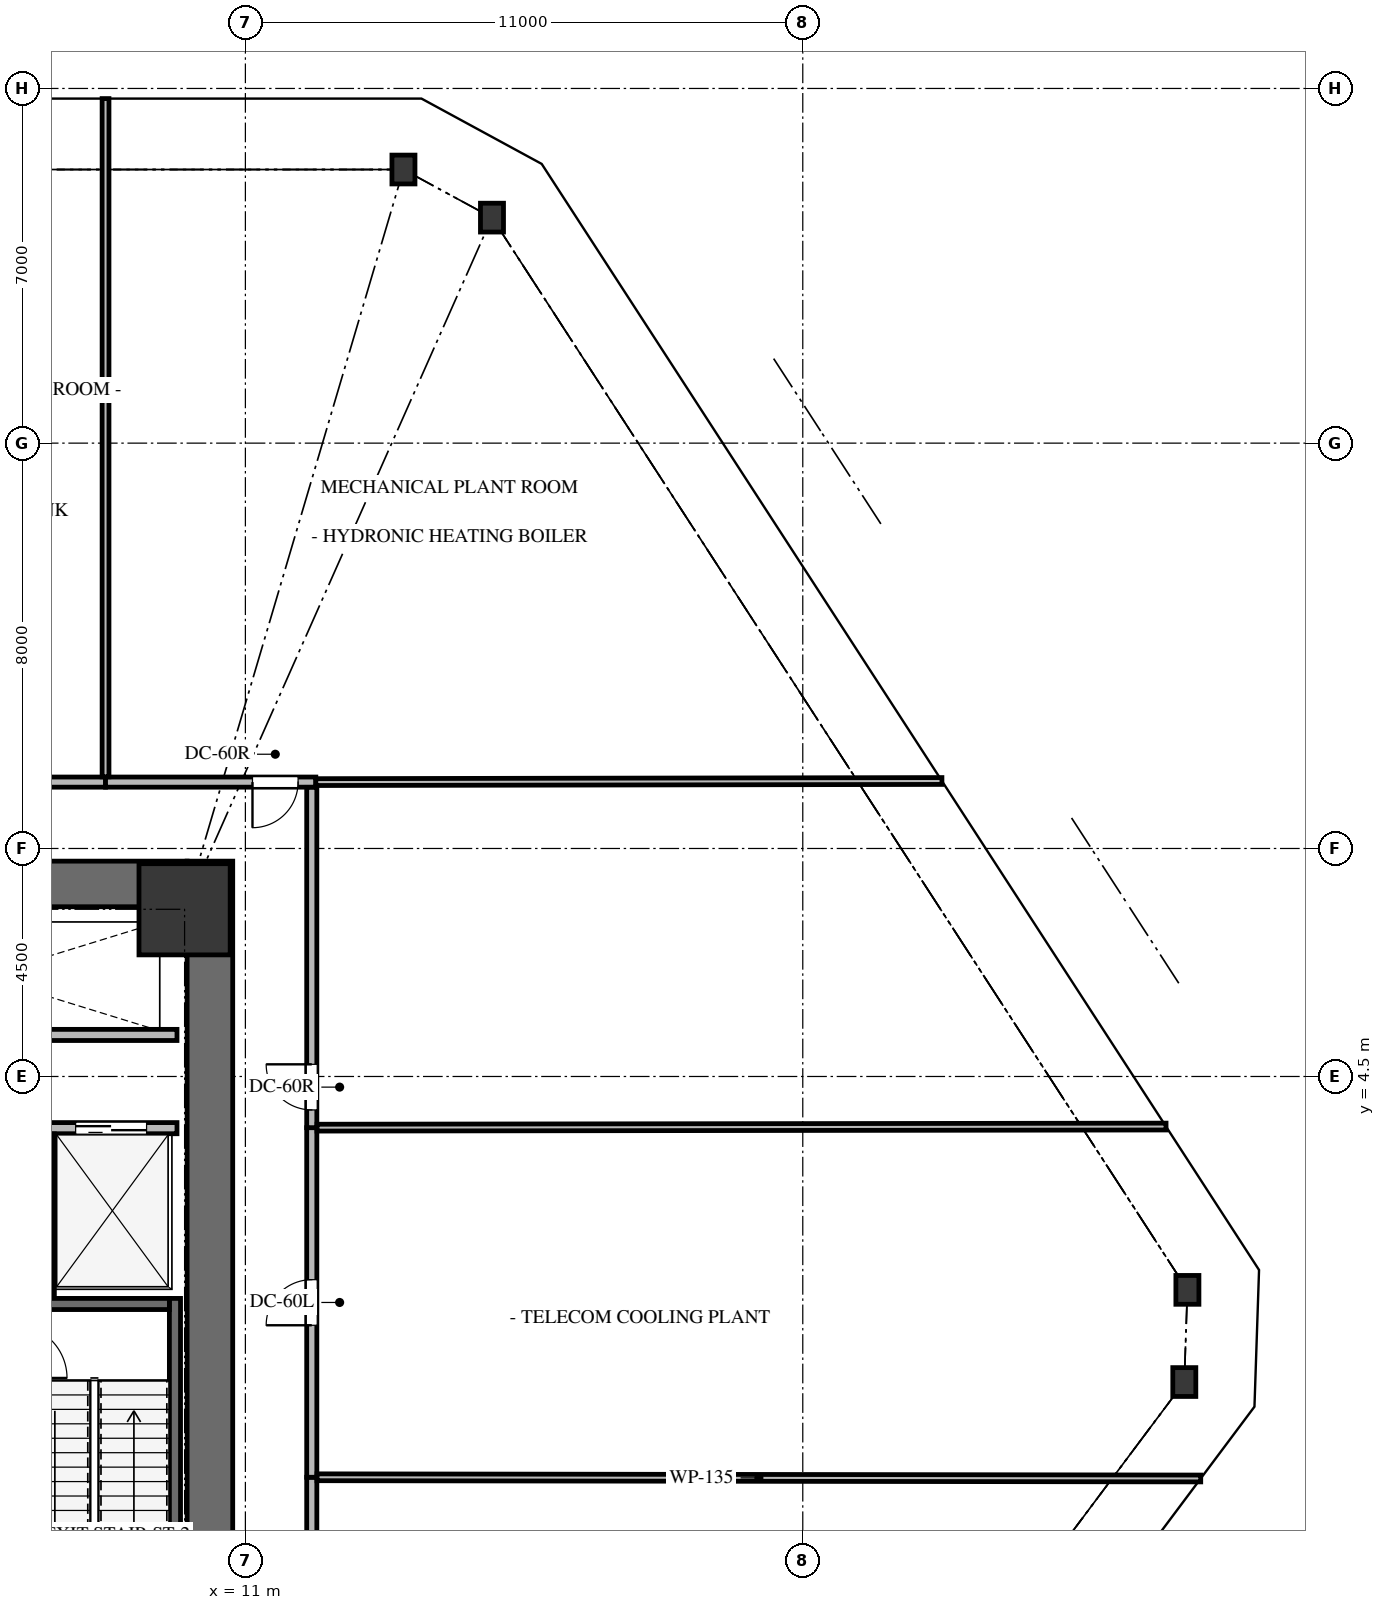
"""IFC4 building model, lengths in metres.
Left out: names, types, materials, properties, quantities, classifications, styles, units other than length and angle.
Written with IfcOpenShell. Run it as: python <this file> out.ifc"""

import sys

from ifc_helpers import new_model, si_unit, direction, frame, frame_2d, origin, origin_2d, place, context, subcontext, project, spatial, rectangle, i_section, extrude, source, transform, mapped, element, fill, save


model = new_model("IFC4")
c1 = context("Model", 3, precision=1e-05, world=origin(), true_north=direction((0.0, 1.0)))
c2 = subcontext(c1, "Body", "Model", "MODEL_VIEW")
j1 = project(units=[si_unit("LENGTHUNIT", "METRE"), si_unit("PLANEANGLEUNIT", "RADIAN")], contexts=[c1])
p1 = place(None, origin())
s1 = spatial("IfcSite", under=j1, at=p1, CompositionType="ELEMENT")
p2 = place(p1, origin())
s2 = spatial("IfcBuilding", under=s1, at=p2, CompositionType="ELEMENT")
p3 = place(p2, frame((0.0, 0.0, 10.4)))
s3 = spatial("IfcBuildingStorey", under=s2, at=p3, CompositionType="ELEMENT", Elevation=10.4)
p4 = place(p3, frame((10.3, -8.75, 0.0), z_axis=(0.0, 0.0, 1.0), x_axis=(0.0, 1.0, 0.0)))
e1 = element("IfcWall", 1, at=p4, inside=s3, PredefinedType="SHEAR", context=c2, shape_type="SweptSolid", body=[
    extrude(rectangle(XDim=17.5, YDim=0.9, at=frame_2d((8.75, 0.0))), origin(), (0.0, 0.0, 1.0), 5.2),
])
p5 = place(p3, frame((-9.85, 8.3, 0.0), z_axis=(0.0, 0.0, 1.0), x_axis=(1.0, 0.0, 0.0)))
e2 = element("IfcWall", 2, at=p5, inside=s3, PredefinedType="SHEAR", context=c2, shape_type="SweptSolid", body=[
    extrude(rectangle(XDim=19.7, YDim=0.9, at=frame_2d((9.85, 0.0))), origin(), (0.0, 0.0, 1.0), 5.2),
])
p6 = place(p3, frame((9.61, -7.77, -0.35), z_axis=(0.0, 0.0, 1.0), x_axis=(0.0, 1.0, 0.0)))
e3 = element("IfcWall", 3, at=p6, inside=s3, PredefinedType="SHEAR", context=c2, shape_type="SweptSolid", body=[
    extrude(rectangle(XDim=7.89, YDim=0.22, at=frame_2d((3.945, 0.0))), origin(), (0.0, 0.0, 1.0), 5.23),
])
p7 = place(p3, frame((9.5, 0.01, -0.35), z_axis=(0.0, 0.0, 1.0), x_axis=(-1.0, 0.0, 0.0)))
e4 = element("IfcWall", 4, at=p7, inside=s3, PredefinedType="SHEAR", context=c2, shape_type="SweptSolid", body=[
    extrude(rectangle(XDim=2.96, YDim=0.22, at=frame_2d((1.48, 0.0))), origin(), (0.0, 0.0, 1.0), 5.23),
])
m1 = source(origin(), c2, "Body", "SweptSolid", [
    extrude(rectangle(XDim=1.8, YDim=1.8, at=origin_2d()), origin(), (0.0, 0.0, 1.0), 5.23),
])
p8 = place(p3, frame((9.8, 7.8, -0.35), z_axis=(0.0, 0.0, 1.0), x_axis=(1.0, 0.0, 0.0)))
e5 = element("IfcColumn", 5, at=p8, inside=s3, PredefinedType="COLUMN", context=c2, shape_type="MappedRepresentation", body=[
    mapped(m1, transform((0.0, 0.0, 0.0), x_axis=(1.0, 0.0, 0.0), y_axis=(0.0, 1.0, 0.0), z_axis=(0.0, 0.0, 1.0), scale=1.0)),
])
m2 = source(origin(), c2, "Body", "SweptSolid", [
    extrude(i_section(OverallWidth=0.454, OverallDepth=0.569, WebThickness=0.078, FlangeThickness=0.125, FilletRadius=0.031, at=origin_2d()), origin(), (0.0, 0.0, 1.0), 5.23),
])
for number, where, z_axis, x_axis in (
    (6, (14.119, 22.4, -0.35), (0.0, 0.0, 1.0), (1.0, 0.0, 0.0)),
    (7, (15.866, 21.451, -0.35), (0.0, 0.0, 1.0), (1.0, 0.0, 0.0)),
    (8, (29.591, 0.289, -0.35), (0.0, 0.0, 1.0), (1.0, 0.0, 0.0)),
    (9, (29.529, -1.531, -0.35), (0.0, 0.0, 1.0), (1.0, 0.0, 0.0)),
):
    element("IfcColumn", number, at=place(p3, frame(where, z_axis=z_axis, x_axis=x_axis)), inside=s3, PredefinedType="COLUMN", context=c2, shape_type="MappedRepresentation", body=[
        mapped(m2, transform((0.0, 0.0, 0.0), x_axis=(1.0, 0.0, 0.0), y_axis=(0.0, 1.0, 0.0), z_axis=(0.0, 0.0, 1.0), scale=1.0)),
    ])
p9 = place(p3, frame((4.6, 3.48, 0.0), z_axis=(0.0, 0.0, 1.0), x_axis=(1.0, 0.0, 0.0)))
e10 = element("IfcWall", 10, at=p9, inside=s3, PredefinedType="SOLIDWALL", context=c2, shape_type="SweptSolid", body=[
    extrude(rectangle(XDim=5.05, YDim=0.22, at=frame_2d((2.525, 0.0))), origin(), (0.0, 0.0, 1.0), 4.865),
])
p10 = place(p9, frame((0.55, 0.0, 0.0)))
e11 = element("IfcOpeningElement", 11, at=p10, cuts=e10, PredefinedType="OPENING", context=c2, shape_type="SweptSolid", body=[
    extrude(rectangle(XDim=1.4, YDim=2.15, at=frame_2d((0.7, 1.075))), frame((0.0, 0.12, 0.0), z_axis=(0.0, -1.0, 0.0), x_axis=(1.0, 0.0, 0.0)), (0.0, 0.0, 1.0), 0.24),
])
p11 = place(p9, frame((3.05, 0.0, 0.0)))
e12 = element("IfcOpeningElement", 12, at=p11, cuts=e10, PredefinedType="OPENING", context=c2, shape_type="SweptSolid", body=[
    extrude(rectangle(XDim=1.4, YDim=2.15, at=frame_2d((0.7, 1.075))), frame((0.0, 0.12, 0.0), z_axis=(0.0, -1.0, 0.0), x_axis=(1.0, 0.0, 0.0)), (0.0, 0.0, 1.0), 0.24),
])
p12 = place(p3, frame((7.12, 0.18, 0.0), z_axis=(0.0, 0.0, 1.0), x_axis=(0.0, 1.0, 0.0)))
e13 = element("IfcWall", 13, at=p12, inside=s3, PredefinedType="SOLIDWALL", context=c2, shape_type="SweptSolid", body=[
    extrude(rectangle(XDim=3.186, YDim=0.22, at=frame_2d((1.593, 0.0))), origin(), (0.0, 0.0, 1.0), 4.865),
])
p13 = place(p3, frame((2.325, 5.32, 0.0), z_axis=(0.0, 0.0, 1.0), x_axis=(1.0, 0.0, 0.0)))
e14 = element("IfcWall", 14, at=p13, inside=s3, PredefinedType="SOLIDWALL", context=c2, shape_type="SweptSolid", body=[
    extrude(rectangle(XDim=7.325, YDim=0.22, at=frame_2d((3.663, 0.0))), origin(), (0.0, 0.0, 1.0), 4.865),
])
p14 = place(p3, frame((8.24, 10.31, 0.0), z_axis=(0.0, 0.0, 1.0), x_axis=(-1.0, 0.0, 0.0)))
e15 = element("IfcWall", 15, at=p14, inside=s3, PredefinedType="SOLIDWALL", context=c2, shape_type="SweptSolid", body=[
    extrude(rectangle(XDim=5.5, YDim=0.2, at=frame_2d((2.75, 0.0))), origin(), (0.0, 0.0, 1.0), 4.418),
])
p15 = place(p14, frame((2.3, 0.0, 0.0)))
e16 = element("IfcOpeningElement", 16, at=p15, cuts=e15, PredefinedType="OPENING", context=c2, shape_type="SweptSolid", body=[
    extrude(rectangle(XDim=0.9, YDim=2.05, at=frame_2d((0.45, 1.025))), frame((0.0, 0.11, 0.0), z_axis=(0.0, -1.0, 0.0), x_axis=(1.0, 0.0, 0.0)), (0.0, 0.0, 1.0), 0.22),
])
p16 = place(p3, frame((12.39, 10.31, 0.0), z_axis=(0.0, 0.0, 1.0), x_axis=(-1.0, 0.0, 0.0)))
e17 = element("IfcWall", 17, at=p16, inside=s3, PredefinedType="SOLIDWALL", context=c2, shape_type="SweptSolid", body=[
    extrude(rectangle(XDim=4.15, YDim=0.2, at=frame_2d((2.075, 0.0))), origin(), (0.0, 0.0, 1.0), 3.787),
])
p17 = place(p16, frame((0.35, 0.0, 0.0)))
e18 = element("IfcOpeningElement", 18, at=p17, cuts=e17, PredefinedType="OPENING", context=c2, shape_type="SweptSolid", body=[
    extrude(rectangle(XDim=0.9, YDim=2.05, at=frame_2d((0.45, 1.025))), frame((0.0, 0.11, 0.0), z_axis=(0.0, -1.0, 0.0), x_axis=(1.0, 0.0, 0.0)), (0.0, 0.0, 1.0), 0.22),
])
p18 = place(p3, frame((12.31, -10.206, 0.0), z_axis=(0.0, 0.0, 1.0), x_axis=(0.0, 1.0, 0.0)))
e19 = element("IfcWall", 19, at=p18, inside=s3, PredefinedType="SOLIDWALL", context=c2, shape_type="SweptSolid", body=[
    extrude(rectangle(XDim=6.796, YDim=0.2, at=frame_2d((3.398, 0.0))), origin(), (0.0, 0.0, 1.0), 3.787),
])
p19 = place(p18, frame((3.65, 0.0, 0.0)))
e20 = element("IfcOpeningElement", 20, at=p19, cuts=e19, PredefinedType="OPENING", context=c2, shape_type="SweptSolid", body=[
    extrude(rectangle(XDim=0.9, YDim=2.05, at=frame_2d((0.45, 1.025))), frame((0.0, 0.11, 0.0), z_axis=(0.0, -1.0, 0.0), x_axis=(1.0, 0.0, 0.0)), (0.0, 0.0, 1.0), 0.22),
])
p20 = place(p3, frame((12.31, -3.41, 0.0), z_axis=(0.0, 0.0, 1.0), x_axis=(0.0, 1.0, 0.0)))
e21 = element("IfcWall", 21, at=p20, inside=s3, PredefinedType="SOLIDWALL", context=c2, shape_type="SweptSolid", body=[
    extrude(rectangle(XDim=6.9, YDim=0.2, at=frame_2d((3.45, 0.0))), origin(), (0.0, 0.0, 1.0), 3.787),
])
p21 = place(p20, frame((3.0, 0.0, 0.0)))
e22 = element("IfcOpeningElement", 22, at=p21, cuts=e21, PredefinedType="OPENING", context=c2, shape_type="SweptSolid", body=[
    extrude(rectangle(XDim=0.9, YDim=2.05, at=frame_2d((0.45, 1.025))), frame((0.0, 0.11, 0.0), z_axis=(0.0, -1.0, 0.0), x_axis=(1.0, 0.0, 0.0)), (0.0, 0.0, 1.0), 0.22),
])
p22 = place(p3, frame((12.31, 3.49, 0.0), z_axis=(0.0, 0.0, 1.0), x_axis=(0.0, 1.0, 0.0)))
e23 = element("IfcWall", 23, at=p22, inside=s3, PredefinedType="SOLIDWALL", context=c2, shape_type="SweptSolid", body=[
    extrude(rectangle(XDim=6.716, YDim=0.2, at=frame_2d((3.358, 0.0))), origin(), (0.0, 0.0, 1.0), 4.865),
])
p23 = place(p22, frame((0.35, 0.0, 0.0)))
e24 = element("IfcOpeningElement", 24, at=p23, cuts=e23, PredefinedType="OPENING", context=c2, shape_type="SweptSolid", body=[
    extrude(rectangle(XDim=0.9, YDim=2.05, at=frame_2d((0.45, 1.025))), frame((0.0, 0.11, 0.0), z_axis=(0.0, -1.0, 0.0), x_axis=(1.0, 0.0, 0.0)), (0.0, 0.0, 1.0), 0.22),
])
p24 = place(p3, frame((8.24, 23.8, 0.0), z_axis=(0.0, 0.0, 1.0), x_axis=(0.0, -1.0, 0.0)))
e25 = element("IfcWall", 25, at=p24, inside=s3, PredefinedType="PARTITIONING", context=c2, shape_type="SweptSolid", body=[
    extrude(rectangle(XDim=13.386, YDim=0.135, at=frame_2d((6.693, 0.0))), origin(), (0.0, 0.0, 1.0), 4.174),
])
p25 = place(p3, frame((24.746, 10.332, 0.0), z_axis=(0.0, 0.0, 1.0), x_axis=(-0.999998453823, -0.001758508277, 0.0)))
e26 = element("IfcWall", 26, at=p25, inside=s3, PredefinedType="PARTITIONING", context=c2, shape_type="SweptSolid", body=[
    extrude(rectangle(XDim=12.356, YDim=0.135, at=frame_2d((6.178, 0.0))), origin(), (0.0, 0.0, 1.0), 4.174),
])
p26 = place(p3, frame((12.414, -3.41, 0.0), z_axis=(0.0, 0.0, 1.0), x_axis=(0.999999078008, -0.001357933567, 0.0)))
e27 = element("IfcWall", 27, at=p26, inside=s3, PredefinedType="PARTITIONING", context=c2, shape_type="SweptSolid", body=[
    extrude(rectangle(XDim=17.439, YDim=0.135, at=frame_2d((8.72, 0.0))), origin(), (0.0, 0.0, 1.0), 3.787),
])
p27 = place(p3, frame((12.414, 3.49, 0.0), z_axis=(0.0, 0.0, 1.0), x_axis=(0.999999159095, 0.001296845678, 0.0)))
e28 = element("IfcWall", 28, at=p27, inside=s3, PredefinedType="PARTITIONING", context=c2, shape_type="SweptSolid", body=[
    extrude(rectangle(XDim=16.755, YDim=0.135, at=frame_2d((8.377, 0.0))), origin(), (0.0, 0.0, 1.0), 4.174),
])
m3 = source(origin(), c2, "Body", "SweptSolid", [
    extrude(rectangle(XDim=1.4, YDim=2.15, at=frame_2d((0.7, 1.075))), frame((0.0, 0.025, 0.0), z_axis=(0.0, -1.0, 0.0), x_axis=(1.0, 0.0, 0.0)), (0.0, 0.0, 1.0), 0.05),
])
p28 = place(p11, origin())
e29 = element("IfcDoor", 29, at=p28, inside=s3, OperationType="DOUBLE_DOOR_SLIDING", PredefinedType="DOOR", context=c2, shape_type="MappedRepresentation", body=[
    mapped(m3, transform((0.0, 0.0, 0.0), x_axis=(1.0, 0.0, 0.0), y_axis=(0.0, 1.0, 0.0), z_axis=(0.0, 0.0, 1.0), scale=1.0)),
])
fill(e12, e29)
m4 = source(origin(), c2, "Body", "SweptSolid", [
    extrude(rectangle(XDim=0.9, YDim=2.05, at=frame_2d((0.45, 1.025))), frame((0.0, 0.025, 0.0), z_axis=(0.0, -1.0, 0.0), x_axis=(1.0, 0.0, 0.0)), (0.0, 0.0, 1.0), 0.05),
])
p29 = place(p17, origin())
e30 = element("IfcDoor", 30, at=p29, inside=s3, OperationType="SINGLE_SWING_RIGHT", PredefinedType="DOOR", context=c2, shape_type="MappedRepresentation", body=[
    mapped(m4, transform((0.0, 0.0, 0.0), x_axis=(1.0, 0.0, 0.0), y_axis=(0.0, 1.0, 0.0), z_axis=(0.0, 0.0, 1.0), scale=1.0)),
])
fill(e18, e30)
m5 = source(origin(), c2, "Body", "SweptSolid", [
    extrude(rectangle(XDim=0.9, YDim=2.05, at=frame_2d((0.45, 1.025))), frame((0.0, 0.025, 0.0), z_axis=(0.0, -1.0, 0.0), x_axis=(1.0, 0.0, 0.0)), (0.0, 0.0, 1.0), 0.05),
])
p30 = place(p21, origin())
e31 = element("IfcDoor", 31, at=p30, inside=s3, OperationType="SINGLE_SWING_LEFT", PredefinedType="DOOR", context=c2, shape_type="MappedRepresentation", body=[
    mapped(m5, transform((0.0, 0.0, 0.0), x_axis=(1.0, 0.0, 0.0), y_axis=(0.0, 1.0, 0.0), z_axis=(0.0, 0.0, 1.0), scale=1.0)),
])
fill(e22, e31)
p31 = place(p23, origin())
e32 = element("IfcDoor", 32, at=p31, inside=s3, OperationType="SINGLE_SWING_RIGHT", PredefinedType="DOOR", context=c2, shape_type="MappedRepresentation", body=[
    mapped(m4, transform((0.0, 0.0, 0.0), x_axis=(1.0, 0.0, 0.0), y_axis=(0.0, 1.0, 0.0), z_axis=(0.0, 0.0, 1.0), scale=1.0)),
])
fill(e24, e32)
save(model, sys.argv[1])
